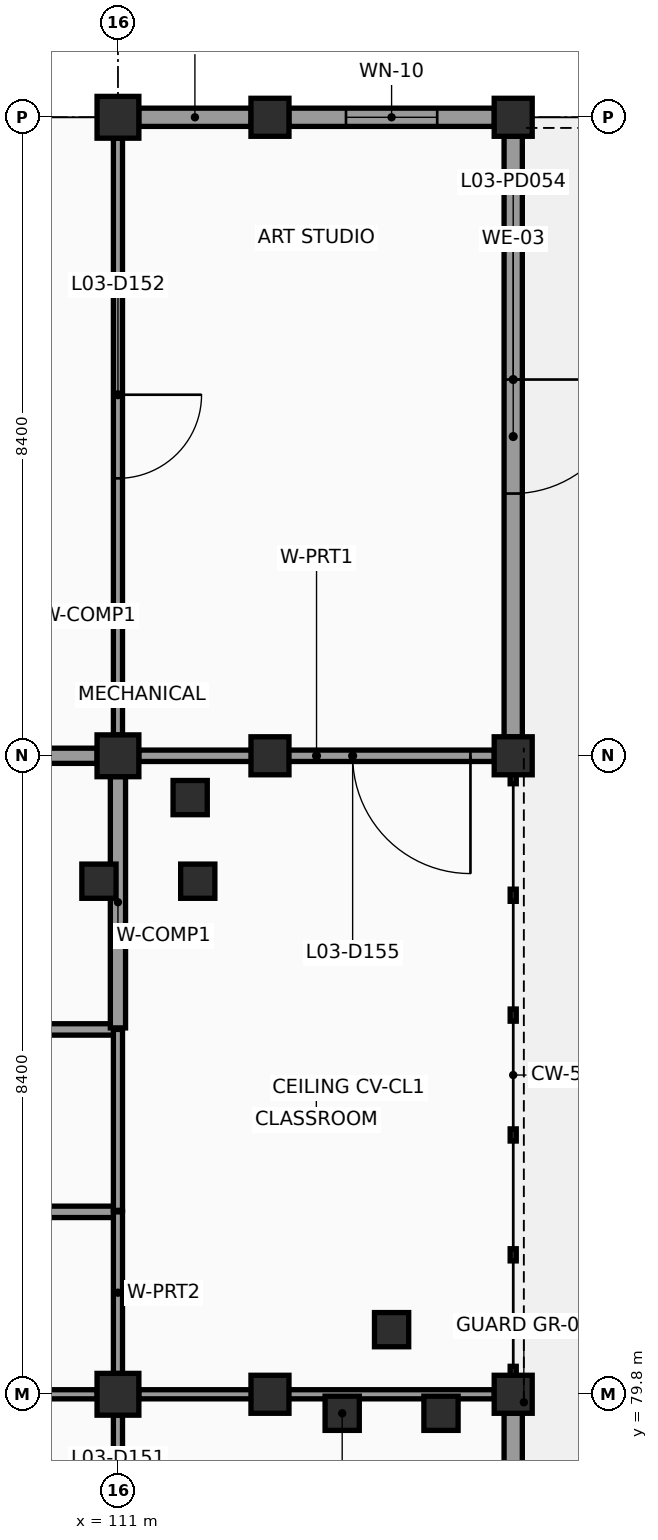
"""IFC4 building model, lengths in metres.
Left out: names, types, materials, properties, quantities, classifications, styles, units other than length and angle.
Written with IfcOpenShell. Run it as: python <this file> out.ifc"""

import sys

from ifc_helpers import new_model, si_unit, direction, frame, frame_2d, origin, origin_2d, place, context, subcontext, project, spatial, rectangle, extrude, element, fill, save


model = new_model("IFC4")
c1 = context("Model", 3, precision=1e-05, world=origin(), true_north=direction((0.0, 1.0)))
c2 = subcontext(c1, "Body", "Model", "MODEL_VIEW")
j1 = project(units=[si_unit("LENGTHUNIT", "METRE"), si_unit("PLANEANGLEUNIT", "RADIAN")], contexts=[c1])
p1 = place(None, origin())
s1 = spatial("IfcSite", under=j1, at=p1, CompositionType="ELEMENT")
p2 = place(p1, origin())
s2 = spatial("IfcBuilding", under=s1, at=p2, CompositionType="ELEMENT")
p3 = place(p2, frame((0.0, 0.0, 11.4)))
s3 = spatial("IfcBuildingStorey", under=s2, at=p3, CompositionType="ELEMENT", Elevation=11.4)
for number, where, z_axis, x_axis in (
    (1, (111.0, 79.8, 0.0), (0.0, 0.0, 1.0), (1.0, 0.0, 0.0)),
    (2, (111.0, 88.2, 0.0), (0.0, 0.0, 1.0), (1.0, 0.0, 0.0)),
    (3, (111.0, 96.6, 0.0), (0.0, 0.0, 1.0), (1.0, 0.0, 0.0)),
):
    element("IfcColumn", number, at=place(p3, frame(where, z_axis=z_axis, x_axis=x_axis)), inside=s3, PredefinedType="COLUMN", context=c2, shape_type="SweptSolid", body=[
        extrude(rectangle(XDim=0.55, YDim=0.55, at=origin_2d()), origin(), (0.0, 0.0, 1.0), 3.6),
    ])
for number, where, z_axis, x_axis in (
    (4, (116.2, 79.8, 0.0), (0.0, 0.0, 1.0), (1.0, 0.0, 0.0)),
    (5, (116.2, 88.2, 0.0), (0.0, 0.0, 1.0), (1.0, 0.0, 0.0)),
    (6, (116.2, 96.6, 0.0), (0.0, 0.0, 1.0), (1.0, 0.0, 0.0)),
):
    element("IfcColumn", number, at=place(p3, frame(where, z_axis=z_axis, x_axis=x_axis)), inside=s3, PredefinedType="COLUMN", context=c2, shape_type="SweptSolid", body=[
        extrude(rectangle(XDim=0.5, YDim=0.5, at=origin_2d()), origin(), (0.0, 0.0, 1.0), 3.28),
    ])
for number, where, z_axis, x_axis in (
    (7, (113.0, 79.8, 0.0), (0.0, 0.0, 1.0), (1.0, 0.0, 0.0)),
    (8, (113.0, 88.2, 0.0), (0.0, 0.0, 1.0), (1.0, 0.0, 0.0)),
    (9, (113.0, 96.6, 0.0), (0.0, 0.0, 1.0), (1.0, 0.0, 0.0)),
):
    element("IfcColumn", number, at=place(p3, frame(where, z_axis=z_axis, x_axis=x_axis)), inside=s3, PredefinedType="COLUMN", context=c2, shape_type="SweptSolid", body=[
        extrude(rectangle(XDim=0.5, YDim=0.5, at=origin_2d()), origin(), (0.0, 0.0, 1.0), 3.6),
    ])
for number, where, z_axis, x_axis in (
    (10, (113.95, 79.55, 0.0), (0.0, 0.0, 1.0), (1.0, 0.0, 0.0)),
    (11, (115.25, 79.55, 0.0), (0.0, 0.0, 1.0), (1.0, 0.0, 0.0)),
    (12, (114.6, 80.65, 0.0), (0.0, 0.0, 1.0), (1.0, 0.0, 0.0)),
    (13, (110.75, 86.55, 0.0), (0.0, 0.0, 1.0), (1.0, 0.0, 0.0)),
    (14, (112.05, 86.55, 0.0), (0.0, 0.0, 1.0), (1.0, 0.0, 0.0)),
    (15, (111.95, 87.65, 0.0), (0.0, 0.0, 1.0), (1.0, 0.0, 0.0)),
):
    element("IfcColumn", number, at=place(p3, frame(where, z_axis=z_axis, x_axis=x_axis)), inside=s3, PredefinedType="COLUMN", context=c2, shape_type="SweptSolid", body=[
        extrude(rectangle(XDim=0.45, YDim=0.45, at=origin_2d()), origin(), (0.0, 0.0, 1.0), 3.6),
    ])
p4 = place(p3, frame((111.273, 96.6, 0.0), z_axis=(0.0, 0.0, 1.0), x_axis=(1.0, 0.0, 0.0)))
e16 = element("IfcWall", 16, at=p4, inside=s3, PredefinedType="SOLIDWALL", context=c2, shape_type="SweptSolid", body=[
    extrude(rectangle(XDim=1.479, YDim=0.24, at=frame_2d((0.74, 0.0))), origin(), (0.0, 0.0, 1.0), 3.34),
])
p5 = place(p3, frame((113.248, 96.6, 0.0), z_axis=(0.0, 0.0, 1.0), x_axis=(1.0, 0.0, 0.0)))
e17 = element("IfcWall", 17, at=p5, inside=s3, PredefinedType="SOLIDWALL", context=c2, shape_type="SweptSolid", body=[
    extrude(rectangle(XDim=2.704, YDim=0.24, at=frame_2d((1.352, 0.0))), origin(), (0.0, 0.0, 1.0), 3.34),
])
p6 = place(p5, frame((0.752, 0.0, 0.95)))
e18 = element("IfcOpeningElement", 18, at=p6, cuts=e17, PredefinedType="OPENING", context=c2, shape_type="SweptSolid", body=[
    extrude(rectangle(XDim=1.2, YDim=1.5, at=frame_2d((0.6, 0.75))), frame((0.0, 0.13, 0.0), z_axis=(0.0, -1.0, 0.0), x_axis=(1.0, 0.0, 0.0)), (0.0, 0.0, 1.0), 0.26),
])
p7 = place(p3, frame((116.2, 96.352, 0.0), z_axis=(0.0, 0.0, 1.0), x_axis=(0.0, -1.0, 0.0)))
e19 = element("IfcWall", 19, at=p7, inside=s3, PredefinedType="SOLIDWALL", context=c2, shape_type="SweptSolid", body=[
    extrude(rectangle(XDim=7.904, YDim=0.24, at=frame_2d((3.952, 0.0))), origin(), (0.0, 0.0, 1.0), 3.34),
])
p8 = place(p7, frame((3.202, 0.0, 0.0)))
e20 = element("IfcOpeningElement", 20, at=p8, cuts=e19, PredefinedType="OPENING", context=c2, shape_type="SweptSolid", body=[
    extrude(rectangle(XDim=1.5, YDim=2.15, at=frame_2d((0.75, 1.075))), frame((0.0, 0.13, 0.0), z_axis=(0.0, -1.0, 0.0), x_axis=(1.0, 0.0, 0.0)), (0.0, 0.0, 1.0), 0.26),
])
p9 = place(p3, frame((116.2, 79.552, 0.0), z_axis=(0.0, 0.0, 1.0), x_axis=(0.0, -1.0, 0.0)))
e21 = element("IfcWall", 21, at=p9, inside=s3, PredefinedType="SOLIDWALL", context=c2, shape_type="SweptSolid", body=[
    extrude(rectangle(XDim=7.904, YDim=0.24, at=frame_2d((3.952, 0.0))), origin(), (0.0, 0.0, 1.0), 3.34),
])
p10 = place(p3, frame((110.727, 79.8, 0.0), z_axis=(0.0, 0.0, 1.0), x_axis=(-1.0, 0.0, 0.0)))
e22 = element("IfcWall", 22, at=p10, inside=s3, PredefinedType="PARTITIONING", context=c2, shape_type="SweptSolid", body=[
    extrude(rectangle(XDim=3.907, YDim=0.12, at=frame_2d((1.954, 0.0))), origin(), (0.0, 0.0, 1.0), 2.59),
])
p11 = place(p10, frame((2.154, 0.0, 0.0)))
e23 = element("IfcOpeningElement", 23, at=p11, cuts=e22, PredefinedType="OPENING", context=c2, shape_type="SweptSolid", body=[
    extrude(rectangle(XDim=0.9, YDim=2.1, at=frame_2d((0.45, 1.05))), frame((0.0, 0.07, 0.0), z_axis=(0.0, -1.0, 0.0), x_axis=(1.0, 0.0, 0.0)), (0.0, 0.0, 1.0), 0.14),
])
p12 = place(p3, frame((106.82, 82.2, 0.0), z_axis=(0.0, 0.0, 1.0), x_axis=(1.0, 0.0, 0.0)))
e24 = element("IfcWall", 24, at=p12, inside=s3, PredefinedType="PARTITIONING", context=c2, shape_type="SweptSolid", body=[
    extrude(rectangle(XDim=4.18, YDim=0.15, at=frame_2d((2.09, 0.0))), origin(), (0.0, 0.0, 1.0), 2.98),
])
p13 = place(p3, frame((111.0, 82.2, 0.0), z_axis=(0.0, 0.0, 1.0), x_axis=(0.0, -1.0, 0.0)))
e25 = element("IfcWall", 25, at=p13, inside=s3, PredefinedType="PARTITIONING", context=c2, shape_type="SweptSolid", body=[
    extrude(rectangle(XDim=2.127, YDim=0.12, at=frame_2d((1.063, 0.0))), origin(), (0.0, 0.0, 1.0), 2.98),
])
p14 = place(p3, frame((106.8, 84.6, 0.0), z_axis=(0.0, 0.0, 1.0), x_axis=(1.0, 0.0, 0.0)))
e26 = element("IfcWall", 26, at=p14, inside=s3, PredefinedType="PARTITIONING", context=c2, shape_type="SweptSolid", body=[
    extrude(rectangle(XDim=4.2, YDim=0.15, at=frame_2d((2.1, 0.0))), origin(), (0.0, 0.0, 1.0), 2.98),
])
p15 = place(p14, frame((1.65, 0.0, 0.0)))
e27 = element("IfcOpeningElement", 27, at=p15, cuts=e26, PredefinedType="OPENING", context=c2, shape_type="SweptSolid", body=[
    extrude(rectangle(XDim=0.9, YDim=2.05, at=frame_2d((0.45, 1.025))), frame((0.0, 0.085, 0.0), z_axis=(0.0, -1.0, 0.0), x_axis=(1.0, 0.0, 0.0)), (0.0, 0.0, 1.0), 0.17),
])
p16 = place(p3, frame((111.0, 84.6, 0.0), z_axis=(0.0, 0.0, 1.0), x_axis=(0.0, -1.0, 0.0)))
e28 = element("IfcWall", 28, at=p16, inside=s3, PredefinedType="PARTITIONING", context=c2, shape_type="SweptSolid", body=[
    extrude(rectangle(XDim=2.38, YDim=0.12, at=frame_2d((1.19, 0.0))), origin(), (0.0, 0.0, 1.0), 2.98),
])
p17 = place(p3, frame((106.82, 88.2, 0.0), z_axis=(0.0, 0.0, 1.0), x_axis=(1.0, 0.0, 0.0)))
e29 = element("IfcWall", 29, at=p17, inside=s3, PredefinedType="PARTITIONING", context=c2, shape_type="SweptSolid", body=[
    extrude(rectangle(XDim=3.907, YDim=0.2, at=frame_2d((1.954, 0.0))), origin(), (0.0, 0.0, 1.0), 2.69),
])
p18 = place(p17, frame((0.678, 0.0, 0.0)))
e30 = element("IfcOpeningElement", 30, at=p18, cuts=e29, PredefinedType="OPENING", context=c2, shape_type="SweptSolid", body=[
    extrude(rectangle(XDim=1.25, YDim=2.15, at=frame_2d((0.625, 1.075))), frame((0.0, 0.11, 0.0), z_axis=(0.0, -1.0, 0.0), x_axis=(1.0, 0.0, 0.0)), (0.0, 0.0, 1.0), 0.22),
])
p19 = place(p3, frame((111.0, 87.927, 0.0), z_axis=(0.0, 0.0, 1.0), x_axis=(0.0, -1.0, 0.0)))
e31 = element("IfcWall", 31, at=p19, inside=s3, PredefinedType="PARTITIONING", context=c2, shape_type="SweptSolid", body=[
    extrude(rectangle(XDim=3.307, YDim=0.2, at=frame_2d((1.653, 0.0))), origin(), (0.0, 0.0, 1.0), 2.98),
])
p20 = place(p3, frame((111.0, 79.527, 0.0), z_axis=(0.0, 0.0, 1.0), x_axis=(0.0, -1.0, 0.0)))
e32 = element("IfcWall", 32, at=p20, inside=s3, PredefinedType="PARTITIONING", context=c2, shape_type="SweptSolid", body=[
    extrude(rectangle(XDim=5.354, YDim=0.12, at=frame_2d((2.677, 0.0))), origin(), (0.0, 0.0, 1.0), 2.98),
])
p21 = place(p20, frame((2.027, 0.0, 0.0)))
e33 = element("IfcOpeningElement", 33, at=p21, cuts=e32, PredefinedType="OPENING", context=c2, shape_type="SweptSolid", body=[
    extrude(rectangle(XDim=1.3, YDim=2.15, at=frame_2d((0.65, 1.075))), frame((0.0, 0.07, 0.0), z_axis=(0.0, -1.0, 0.0), x_axis=(1.0, 0.0, 0.0)), (0.0, 0.0, 1.0), 0.14),
])
p22 = place(p3, frame((111.0, 96.327, 0.0), z_axis=(0.0, 0.0, 1.0), x_axis=(0.0, -1.0, 0.0)))
e34 = element("IfcWall", 34, at=p22, inside=s3, PredefinedType="PARTITIONING", context=c2, shape_type="SweptSolid", body=[
    extrude(rectangle(XDim=7.854, YDim=0.12, at=frame_2d((3.927, 0.0))), origin(), (0.0, 0.0, 1.0), 2.98),
])
p23 = place(p22, frame((3.377, 0.0, 0.0)))
e35 = element("IfcOpeningElement", 35, at=p23, cuts=e34, PredefinedType="OPENING", context=c2, shape_type="SweptSolid", body=[
    extrude(rectangle(XDim=1.1, YDim=2.1, at=frame_2d((0.55, 1.05))), frame((0.0, 0.07, 0.0), z_axis=(0.0, -1.0, 0.0), x_axis=(1.0, 0.0, 0.0)), (0.0, 0.0, 1.0), 0.14),
])
p24 = place(p3, frame((115.952, 79.8, 0.0), z_axis=(0.0, 0.0, 1.0), x_axis=(-1.0, 0.0, 0.0)))
e36 = element("IfcWall", 36, at=p24, inside=s3, PredefinedType="PARTITIONING", context=c2, shape_type="SweptSolid", body=[
    extrude(rectangle(XDim=4.679, YDim=0.12, at=frame_2d((2.339, 0.0))), origin(), (0.0, 0.0, 1.0), 3.34),
])
p25 = place(p3, frame((111.273, 88.2, 0.0), z_axis=(0.0, 0.0, 1.0), x_axis=(1.0, 0.0, 0.0)))
e37 = element("IfcWall", 37, at=p25, inside=s3, PredefinedType="PARTITIONING", context=c2, shape_type="SweptSolid", body=[
    extrude(rectangle(XDim=4.679, YDim=0.15, at=frame_2d((2.339, 0.0))), origin(), (0.0, 0.0, 1.0), 3.34),
])
p26 = place(p25, frame((2.814, 0.0, 0.0)))
e38 = element("IfcOpeningElement", 38, at=p26, cuts=e37, PredefinedType="OPENING", context=c2, shape_type="SweptSolid", body=[
    extrude(rectangle(XDim=1.55, YDim=2.2, at=frame_2d((0.775, 1.1))), frame((0.0, 0.085, 0.0), z_axis=(0.0, -1.0, 0.0), x_axis=(1.0, 0.0, 0.0)), (0.0, 0.0, 1.0), 0.17),
])
p27 = place(p6, origin())
e39 = element("IfcWindow", 39, at=p27, inside=s3, PartitioningType="SINGLE_PANEL", PredefinedType="WINDOW", context=c2, shape_type="SweptSolid", body=[
    extrude(rectangle(XDim=1.2, YDim=1.5, at=frame_2d((0.6, 0.75))), frame((0.0, 0.03, 0.0), z_axis=(0.0, -1.0, 0.0), x_axis=(1.0, 0.0, 0.0)), (0.0, 0.0, 1.0), 0.06),
])
fill(e18, e39)
p28 = place(p8, origin())
e40 = element("IfcDoor", 40, at=p28, inside=s3, OperationType="SINGLE_SWING_LEFT", PredefinedType="DOOR", context=c2, shape_type="SweptSolid", body=[
    extrude(rectangle(XDim=1.5, YDim=2.15, at=frame_2d((0.75, 1.075))), frame((0.0, 0.025, 0.0), z_axis=(0.0, -1.0, 0.0), x_axis=(1.0, 0.0, 0.0)), (0.0, 0.0, 1.0), 0.05),
])
fill(e20, e40)
p29 = place(p23, origin())
e41 = element("IfcDoor", 41, at=p29, inside=s3, OperationType="SINGLE_SWING_LEFT", PredefinedType="DOOR", context=c2, shape_type="SweptSolid", body=[
    extrude(rectangle(XDim=1.1, YDim=2.1, at=frame_2d((0.55, 1.05))), frame((0.0, 0.025, 0.0), z_axis=(0.0, -1.0, 0.0), x_axis=(1.0, 0.0, 0.0)), (0.0, 0.0, 1.0), 0.05),
])
fill(e35, e41)
p30 = place(p26, origin())
e42 = element("IfcDoor", 42, at=p30, inside=s3, OperationType="DOUBLE_DOOR_SINGLE_SWING", PredefinedType="DOOR", context=c2, shape_type="SweptSolid", body=[
    extrude(rectangle(XDim=1.55, YDim=2.2, at=frame_2d((0.775, 1.1))), frame((0.0, 0.025, 0.0), z_axis=(0.0, -1.0, 0.0), x_axis=(1.0, 0.0, 0.0)), (0.0, 0.0, 1.0), 0.05),
])
fill(e38, e42)
save(model, sys.argv[1])
